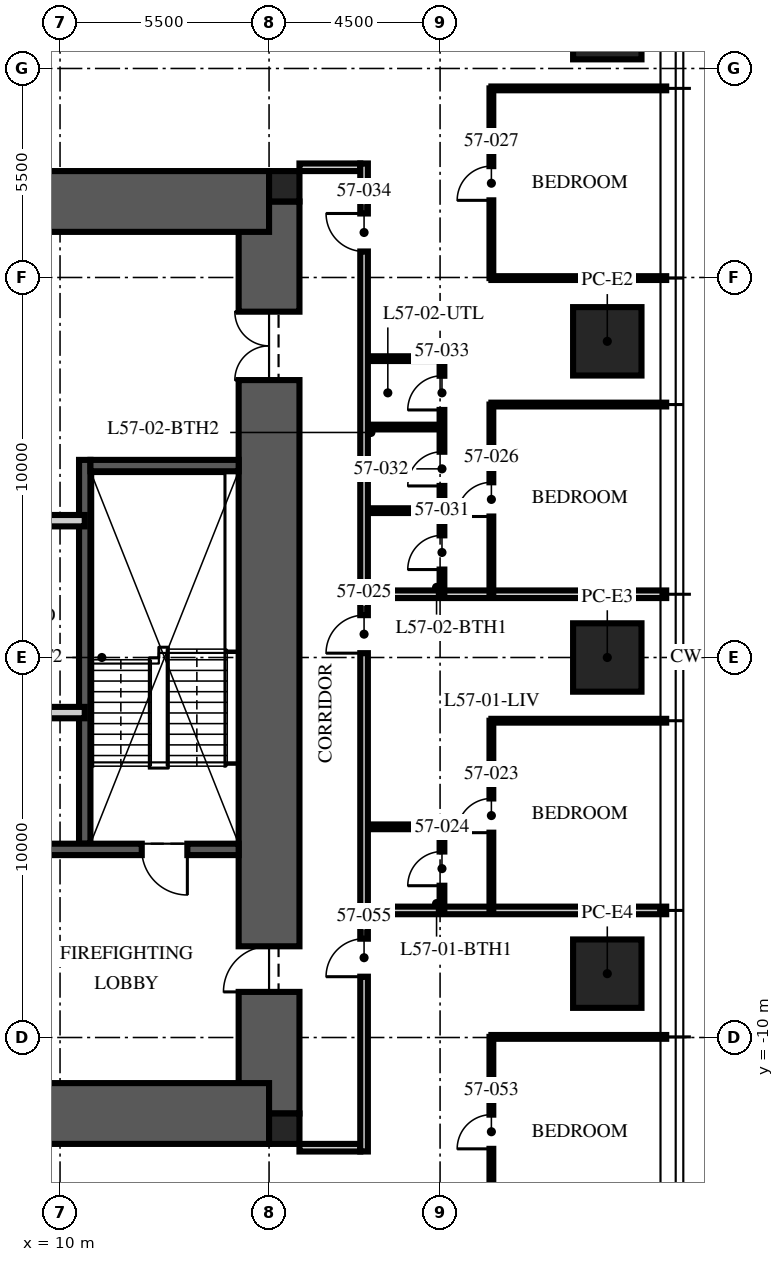
"""IFC4 building model, lengths in metres.
Left out: names, types, materials, properties, quantities, classifications, styles, units other than length and angle.
Written with IfcOpenShell. Run it as: python <this file> out.ifc"""

import sys

from ifc_helpers import new_model, si_unit, direction, frame, frame_2d, origin, origin_2d, place, context, subcontext, project, spatial, rectangle, extrude, element, fill, save


model = new_model("IFC4")
c1 = context("Model", 3, precision=1e-05, world=origin(), true_north=direction((0.0, 1.0)))
c2 = subcontext(c1, "Body", "Model", "MODEL_VIEW")
j1 = project(units=[si_unit("LENGTHUNIT", "METRE"), si_unit("PLANEANGLEUNIT", "RADIAN")], contexts=[c1])
p1 = place(None, origin())
s1 = spatial("IfcSite", under=j1, at=p1, CompositionType="ELEMENT")
p2 = place(p1, origin())
s2 = spatial("IfcBuilding", under=s1, at=p2, CompositionType="ELEMENT")
p3 = place(p2, frame((0.0, 0.0, 229.5)))
s3 = spatial("IfcBuildingStorey", under=s2, at=p3, CompositionType="ELEMENT", Elevation=229.5)
p4 = place(p3, frame((15.5, -12.0, -0.25), z_axis=(0.0, 0.0, 1.0), x_axis=(0.0, 1.0, 0.0)))
e1 = element("IfcWall", 1, at=p4, inside=s3, PredefinedType="SHEAR", context=c2, shape_type="SweptSolid", body=[
    extrude(rectangle(XDim=24.0, YDim=1.6, at=frame_2d((12.0, 0.0))), origin(), (0.0, 0.0, 1.0), 3.75),
])
p5 = place(p4, frame((3.2, 0.0, 0.25)))
e2 = element("IfcOpeningElement", 2, at=p5, cuts=e1, PredefinedType="OPENING", context=c2, shape_type="SweptSolid", body=[
    extrude(rectangle(XDim=1.2, YDim=2.1, at=frame_2d((0.6, 1.05))), frame((0.0, 0.81, 0.0), z_axis=(0.0, -1.0, 0.0), x_axis=(1.0, 0.0, 0.0)), (0.0, 0.0, 1.0), 1.62),
])
p6 = place(p4, frame((19.3, 0.0, 0.25)))
e3 = element("IfcOpeningElement", 3, at=p6, cuts=e1, PredefinedType="OPENING", context=c2, shape_type="SweptSolid", body=[
    extrude(rectangle(XDim=1.8, YDim=2.1, at=frame_2d((0.9, 1.05))), frame((0.0, 0.81, 0.0), z_axis=(0.0, -1.0, 0.0), x_axis=(1.0, 0.0, 0.0)), (0.0, 0.0, 1.0), 1.62),
])
for number, where, z_axis, x_axis in (
    (4, (-15.5, 12.0, -0.25), (0.0, 0.0, 1.0), (1.0, 0.0, 0.0)),
    (5, (-15.5, -12.0, -0.25), (0.0, 0.0, 1.0), (1.0, 0.0, 0.0)),
):
    element("IfcWall", number, at=place(p3, frame(where, z_axis=z_axis, x_axis=x_axis)), inside=s3, PredefinedType="SHEAR", context=c2, shape_type="SweptSolid", body=[
        extrude(rectangle(XDim=31.0, YDim=1.6, at=frame_2d((15.5, 0.0))), origin(), (0.0, 0.0, 1.0), 3.75),
    ])
for number, where, z_axis, x_axis in (
    (6, (15.9, 12.4, -0.25), (0.0, 0.0, 1.0), (1.0, 0.0, 0.0)),
    (7, (15.9, -12.4, -0.25), (0.0, 0.0, 1.0), (1.0, 0.0, 0.0)),
):
    element("IfcColumn", number, at=place(p3, frame(where, z_axis=z_axis, x_axis=x_axis)), inside=s3, PredefinedType="COLUMN", context=c2, shape_type="SweptSolid", body=[
        extrude(rectangle(XDim=0.8, YDim=0.8, at=origin_2d()), origin(), (0.0, 0.0, 1.0), 3.75),
    ])
for number, where, z_axis, x_axis in (
    (8, (24.4, 16.64, 0.0), (0.0, 0.0, 1.0), (0.0, 1.0, 0.0)),
    (9, (24.4, 8.32, 0.0), (0.0, 0.0, 1.0), (0.0, 1.0, 0.0)),
    (10, (24.4, 0.0, 0.0), (0.0, 0.0, 1.0), (0.0, 1.0, 0.0)),
    (11, (24.4, -8.32, 0.0), (0.0, 0.0, 1.0), (0.0, 1.0, 0.0)),
):
    element("IfcColumn", number, at=place(p3, frame(where, z_axis=z_axis, x_axis=x_axis)), inside=s3, PredefinedType="COLUMN", context=c2, shape_type="SweptSolid", body=[
        extrude(rectangle(XDim=1.8, YDim=1.8, at=origin_2d()), origin(), (0.0, 0.0, 1.0), 3.75),
    ])
p7 = place(p3, frame((10.65, -4.9, 0.0), z_axis=(0.0, 0.0, 1.0), x_axis=(0.0, 1.0, 0.0)))
e12 = element("IfcWall", 12, at=p7, inside=s3, PredefinedType="SOLIDWALL", context=c2, shape_type="SweptSolid", body=[
    extrude(rectangle(XDim=10.1, YDim=0.3, at=frame_2d((5.05, 0.0))), origin(), (0.0, 0.0, 1.0), 3.5),
])
p8 = place(p3, frame((14.7, -5.05, 0.0), z_axis=(0.0, 0.0, 1.0), x_axis=(-1.0, 0.0, 0.0)))
e13 = element("IfcWall", 13, at=p8, inside=s3, PredefinedType="SOLIDWALL", context=c2, shape_type="SweptSolid", body=[
    extrude(rectangle(XDim=5.9, YDim=0.3, at=frame_2d((2.95, 0.0))), origin(), (0.0, 0.0, 1.0), 3.5),
])
p9 = place(p8, frame((1.35, 0.0, 0.0)))
e14 = element("IfcOpeningElement", 14, at=p9, cuts=e13, PredefinedType="OPENING", context=c2, shape_type="SweptSolid", body=[
    extrude(rectangle(XDim=1.2, YDim=2.1, at=frame_2d((0.6, 1.05))), frame((0.0, 0.16, 0.0), z_axis=(0.0, -1.0, 0.0), x_axis=(1.0, 0.0, 0.0)), (0.0, 0.0, 1.0), 0.32),
])
p10 = place(p3, frame((14.7, 5.05, 0.0), z_axis=(0.0, 0.0, 1.0), x_axis=(-1.0, 0.0, 0.0)))
e15 = element("IfcWall", 15, at=p10, inside=s3, PredefinedType="SOLIDWALL", context=c2, shape_type="SweptSolid", body=[
    extrude(rectangle(XDim=3.9, YDim=0.3, at=frame_2d((1.95, 0.0))), origin(), (0.0, 0.0, 1.0), 3.5),
])
p11 = place(p3, frame((-10.65, 3.6, 0.0), z_axis=(0.0, 0.0, 1.0), x_axis=(1.0, 0.0, 0.0)))
e16 = element("IfcWall", 16, at=p11, inside=s3, PredefinedType="PARTITIONING", context=c2, shape_type="SweptSolid", body=[
    extrude(rectangle(XDim=21.3, YDim=0.3, at=frame_2d((10.65, 0.0))), origin(), (0.0, 0.0, 1.0), 3.5),
])
p12 = place(p11, frame((10.05, 0.0, 0.0)))
e17 = element("IfcOpeningElement", 17, at=p12, cuts=e16, PredefinedType="OPENING", context=c2, shape_type="SweptSolid", body=[
    extrude(rectangle(XDim=1.2, YDim=2.1, at=frame_2d((0.6, 1.05))), frame((0.0, 0.16, 0.0), z_axis=(0.0, -1.0, 0.0), x_axis=(1.0, 0.0, 0.0)), (0.0, 0.0, 1.0), 0.32),
])
p13 = place(p11, frame((19.238, 0.0, 0.0)))
e18 = element("IfcOpeningElement", 18, at=p13, cuts=e16, PredefinedType="OPENING", context=c2, shape_type="SweptSolid", body=[
    extrude(rectangle(XDim=0.9, YDim=2.1, at=frame_2d((0.45, 1.05))), frame((0.0, 0.16, 0.0), z_axis=(0.0, -1.0, 0.0), x_axis=(1.0, 0.0, 0.0)), (0.0, 0.0, 1.0), 0.32),
])
p14 = place(p3, frame((10.65, -1.45, 0.0), z_axis=(0.0, 0.0, 1.0), x_axis=(-1.0, 0.0, 0.0)))
e19 = element("IfcWall", 19, at=p14, inside=s3, PredefinedType="PARTITIONING", context=c2, shape_type="SweptSolid", body=[
    extrude(rectangle(XDim=6.45, YDim=0.3, at=frame_2d((3.225, 0.0))), origin(), (0.0, 0.0, 1.0), 3.5),
])
for number, where, z_axis, x_axis in (
    (20, (16.3, 12.9, 0.0), (0.0, 0.0, 1.0), (1.0, 0.0, 0.0)),
    (21, (16.3, -12.9, 0.0), (0.0, 0.0, 1.0), (1.0, 0.0, 0.0)),
):
    element("IfcWall", number, at=place(p3, frame(where, z_axis=z_axis, x_axis=x_axis)), inside=s3, PredefinedType="PARTITIONING", context=c2, shape_type="SweptSolid", body=[
        extrude(rectangle(XDim=1.6, YDim=0.2, at=frame_2d((0.8, 0.0))), origin(), (0.0, 0.0, 1.0), 2.3),
    ])
p15 = place(p3, frame((18.1, -6.656, 0.0), z_axis=(0.0, 0.0, 1.0), x_axis=(1.0, 0.0, 0.0)))
e22 = element("IfcWall", 22, at=p15, inside=s3, PredefinedType="PARTITIONING", context=c2, shape_type="SweptSolid", body=[
    extrude(rectangle(XDim=7.85, YDim=0.2, at=frame_2d((3.925, 0.0))), origin(), (0.0, 0.0, 1.0), 2.91),
])
p16 = place(p3, frame((21.35, -1.664, 0.0), z_axis=(0.0, 0.0, 1.0), x_axis=(1.0, 0.0, 0.0)))
e23 = element("IfcWall", 23, at=p16, inside=s3, PredefinedType="PARTITIONING", context=c2, shape_type="SweptSolid", body=[
    extrude(rectangle(XDim=4.6, YDim=0.1, at=frame_2d((2.3, 0.0))), origin(), (0.0, 0.0, 1.0), 2.91),
])
p17 = place(p3, frame((18.1, 1.664, 0.0), z_axis=(0.0, 0.0, 1.0), x_axis=(1.0, 0.0, 0.0)))
e24 = element("IfcWall", 24, at=p17, inside=s3, PredefinedType="PARTITIONING", context=c2, shape_type="SweptSolid", body=[
    extrude(rectangle(XDim=7.85, YDim=0.2, at=frame_2d((3.925, 0.0))), origin(), (0.0, 0.0, 1.0), 2.91),
])
for number, where, z_axis, x_axis in (
    (25, (21.35, 6.656, 0.0), (0.0, 0.0, 1.0), (1.0, 0.0, 0.0)),
    (26, (21.35, 9.984, 0.0), (0.0, 0.0, 1.0), (1.0, 0.0, 0.0)),
    (27, (21.35, 14.976, 0.0), (0.0, 0.0, 1.0), (1.0, 0.0, 0.0)),
    (28, (21.35, -9.984, 0.0), (0.0, 0.0, 1.0), (1.0, 0.0, 0.0)),
):
    element("IfcWall", number, at=place(p3, frame(where, z_axis=z_axis, x_axis=x_axis)), inside=s3, PredefinedType="PARTITIONING", context=c2, shape_type="SweptSolid", body=[
        extrude(rectangle(XDim=4.6, YDim=0.1, at=frame_2d((2.3, 0.0))), origin(), (0.0, 0.0, 1.0), 2.91),
    ])
p18 = place(p3, frame((21.35, -6.656, 0.0), z_axis=(0.0, 0.0, 1.0), x_axis=(0.0, 1.0, 0.0)))
e29 = element("IfcWall", 29, at=p18, inside=s3, PredefinedType="PARTITIONING", context=c2, shape_type="SweptSolid", body=[
    extrude(rectangle(XDim=4.992, YDim=0.1, at=frame_2d((2.496, 0.0))), origin(), (0.0, 0.0, 1.0), 2.81),
])
p19 = place(p18, frame((2.046, 0.0, 0.0)))
e30 = element("IfcOpeningElement", 30, at=p19, cuts=e29, PredefinedType="OPENING", context=c2, shape_type="SweptSolid", body=[
    extrude(rectangle(XDim=0.9, YDim=2.1, at=frame_2d((0.45, 1.05))), frame((0.0, 0.06, 0.0), z_axis=(0.0, -1.0, 0.0), x_axis=(1.0, 0.0, 0.0)), (0.0, 0.0, 1.0), 0.12),
])
p20 = place(p3, frame((20.05, -6.656, 0.0), z_axis=(0.0, 0.0, 1.0), x_axis=(0.0, 1.0, 0.0)))
e31 = element("IfcWall", 31, at=p20, inside=s3, PredefinedType="PARTITIONING", context=c2, shape_type="SweptSolid", body=[
    extrude(rectangle(XDim=2.2, YDim=0.125, at=frame_2d((1.1, 0.0))), origin(), (0.0, 0.0, 1.0), 3.5),
])
p21 = place(p20, frame((0.65, 0.0, 0.0)))
e32 = element("IfcOpeningElement", 32, at=p21, cuts=e31, PredefinedType="OPENING", context=c2, shape_type="SweptSolid", body=[
    extrude(rectangle(XDim=0.9, YDim=2.1, at=frame_2d((0.45, 1.05))), frame((0.0, 0.073, 0.0), z_axis=(0.0, -1.0, 0.0), x_axis=(1.0, 0.0, 0.0)), (0.0, 0.0, 1.0), 0.145),
])
p22 = place(p3, frame((18.1, -4.456, 0.0), z_axis=(0.0, 0.0, 1.0), x_axis=(1.0, 0.0, 0.0)))
e33 = element("IfcWall", 33, at=p22, inside=s3, PredefinedType="PARTITIONING", context=c2, shape_type="SweptSolid", body=[
    extrude(rectangle(XDim=1.95, YDim=0.125, at=frame_2d((0.975, 0.0))), origin(), (0.0, 0.0, 1.0), 3.5),
])
p23 = place(p3, frame((21.35, 1.664, 0.0), z_axis=(0.0, 0.0, 1.0), x_axis=(0.0, 1.0, 0.0)))
e34 = element("IfcWall", 34, at=p23, inside=s3, PredefinedType="PARTITIONING", context=c2, shape_type="SweptSolid", body=[
    extrude(rectangle(XDim=4.992, YDim=0.1, at=frame_2d((2.496, 0.0))), origin(), (0.0, 0.0, 1.0), 2.81),
])
p24 = place(p23, frame((2.046, 0.0, 0.0)))
e35 = element("IfcOpeningElement", 35, at=p24, cuts=e34, PredefinedType="OPENING", context=c2, shape_type="SweptSolid", body=[
    extrude(rectangle(XDim=0.9, YDim=2.1, at=frame_2d((0.45, 1.05))), frame((0.0, 0.06, 0.0), z_axis=(0.0, -1.0, 0.0), x_axis=(1.0, 0.0, 0.0)), (0.0, 0.0, 1.0), 0.12),
])
p25 = place(p3, frame((21.35, 9.984, 0.0), z_axis=(0.0, 0.0, 1.0), x_axis=(0.0, 1.0, 0.0)))
e36 = element("IfcWall", 36, at=p25, inside=s3, PredefinedType="PARTITIONING", context=c2, shape_type="SweptSolid", body=[
    extrude(rectangle(XDim=4.992, YDim=0.1, at=frame_2d((2.496, 0.0))), origin(), (0.0, 0.0, 1.0), 2.81),
])
p26 = place(p25, frame((2.046, 0.0, 0.0)))
e37 = element("IfcOpeningElement", 37, at=p26, cuts=e36, PredefinedType="OPENING", context=c2, shape_type="SweptSolid", body=[
    extrude(rectangle(XDim=0.9, YDim=2.1, at=frame_2d((0.45, 1.05))), frame((0.0, 0.06, 0.0), z_axis=(0.0, -1.0, 0.0), x_axis=(1.0, 0.0, 0.0)), (0.0, 0.0, 1.0), 0.12),
])
p27 = place(p3, frame((20.05, 1.664, 0.0), z_axis=(0.0, 0.0, 1.0), x_axis=(0.0, 1.0, 0.0)))
e38 = element("IfcWall", 38, at=p27, inside=s3, PredefinedType="PARTITIONING", context=c2, shape_type="SweptSolid", body=[
    extrude(rectangle(XDim=6.2, YDim=0.125, at=frame_2d((3.1, 0.0))), origin(), (0.0, 0.0, 1.0), 2.81),
])
p28 = place(p27, frame((0.65, 0.0, 0.0)))
e39 = element("IfcOpeningElement", 39, at=p28, cuts=e38, PredefinedType="OPENING", context=c2, shape_type="SweptSolid", body=[
    extrude(rectangle(XDim=0.9, YDim=2.1, at=frame_2d((0.45, 1.05))), frame((0.0, 0.073, 0.0), z_axis=(0.0, -1.0, 0.0), x_axis=(1.0, 0.0, 0.0)), (0.0, 0.0, 1.0), 0.145),
])
p29 = place(p27, frame((2.85, 0.0, 0.0)))
e40 = element("IfcOpeningElement", 40, at=p29, cuts=e38, PredefinedType="OPENING", context=c2, shape_type="SweptSolid", body=[
    extrude(rectangle(XDim=0.9, YDim=2.1, at=frame_2d((0.45, 1.05))), frame((0.0, 0.073, 0.0), z_axis=(0.0, -1.0, 0.0), x_axis=(1.0, 0.0, 0.0)), (0.0, 0.0, 1.0), 0.145),
])
p30 = place(p27, frame((4.85, 0.0, 0.0)))
e41 = element("IfcOpeningElement", 41, at=p30, cuts=e38, PredefinedType="OPENING", context=c2, shape_type="SweptSolid", body=[
    extrude(rectangle(XDim=0.9, YDim=2.1, at=frame_2d((0.45, 1.05))), frame((0.0, 0.073, 0.0), z_axis=(0.0, -1.0, 0.0), x_axis=(1.0, 0.0, 0.0)), (0.0, 0.0, 1.0), 0.145),
])
for number, where, z_axis, x_axis in (
    (42, (18.1, 3.864, 0.0), (0.0, 0.0, 1.0), (1.0, 0.0, 0.0)),
    (43, (18.1, 6.064, 0.0), (0.0, 0.0, 1.0), (1.0, 0.0, 0.0)),
    (44, (18.1, 7.864, 0.0), (0.0, 0.0, 1.0), (1.0, 0.0, 0.0)),
):
    element("IfcWall", number, at=place(p3, frame(where, z_axis=z_axis, x_axis=x_axis)), inside=s3, PredefinedType="PARTITIONING", context=c2, shape_type="SweptSolid", body=[
        extrude(rectangle(XDim=1.95, YDim=0.125, at=frame_2d((0.975, 0.0))), origin(), (0.0, 0.0, 1.0), 3.5),
    ])
p31 = place(p3, frame((21.35, -14.976, 0.0), z_axis=(0.0, 0.0, 1.0), x_axis=(0.0, 1.0, 0.0)))
e45 = element("IfcWall", 45, at=p31, inside=s3, PredefinedType="PARTITIONING", context=c2, shape_type="SweptSolid", body=[
    extrude(rectangle(XDim=4.992, YDim=0.1, at=frame_2d((2.496, 0.0))), origin(), (0.0, 0.0, 1.0), 2.81),
])
p32 = place(p31, frame((2.046, 0.0, 0.0)))
e46 = element("IfcOpeningElement", 46, at=p32, cuts=e45, PredefinedType="OPENING", context=c2, shape_type="SweptSolid", body=[
    extrude(rectangle(XDim=0.9, YDim=2.1, at=frame_2d((0.45, 1.05))), frame((0.0, 0.06, 0.0), z_axis=(0.0, -1.0, 0.0), x_axis=(1.0, 0.0, 0.0)), (0.0, 0.0, 1.0), 0.12),
])
p33 = place(p3, frame((18.0, -13.0, 0.0), z_axis=(0.0, 0.0, 1.0), x_axis=(0.0, 1.0, 0.0)))
e47 = element("IfcWall", 47, at=p33, inside=s3, PredefinedType="PARTITIONING", context=c2, shape_type="SweptSolid", body=[
    extrude(rectangle(XDim=26.0, YDim=0.2, at=frame_2d((13.0, 0.0))), origin(), (0.0, 0.0, 1.0), 2.6),
])
p34 = place(p33, frame((13.114, 0.0, 0.0)))
e48 = element("IfcOpeningElement", 48, at=p34, cuts=e47, PredefinedType="OPENING", context=c2, shape_type="SweptSolid", body=[
    extrude(rectangle(XDim=1.0, YDim=2.2, at=frame_2d((0.5, 1.1))), frame((0.0, 0.11, 0.0), z_axis=(0.0, -1.0, 0.0), x_axis=(1.0, 0.0, 0.0)), (0.0, 0.0, 1.0), 0.22),
])
p35 = place(p33, frame((23.684, 0.0, 0.0)))
e49 = element("IfcOpeningElement", 49, at=p35, cuts=e47, PredefinedType="OPENING", context=c2, shape_type="SweptSolid", body=[
    extrude(rectangle(XDim=1.0, YDim=2.2, at=frame_2d((0.5, 1.1))), frame((0.0, 0.11, 0.0), z_axis=(0.0, -1.0, 0.0), x_axis=(1.0, 0.0, 0.0)), (0.0, 0.0, 1.0), 0.22),
])
p36 = place(p33, frame((4.6, 0.0, 0.0)))
e50 = element("IfcOpeningElement", 50, at=p36, cuts=e47, PredefinedType="OPENING", context=c2, shape_type="SweptSolid", body=[
    extrude(rectangle(XDim=1.0, YDim=2.2, at=frame_2d((0.5, 1.1))), frame((0.0, 0.11, 0.0), z_axis=(0.0, -1.0, 0.0), x_axis=(1.0, 0.0, 0.0)), (0.0, 0.0, 1.0), 0.22),
])
p37 = place(p9, origin())
e51 = element("IfcDoor", 51, at=p37, inside=s3, OperationType="SINGLE_SWING_LEFT", PredefinedType="DOOR", context=c2, shape_type="SweptSolid", body=[
    extrude(rectangle(XDim=1.2, YDim=2.1, at=frame_2d((0.6, 1.05))), frame((0.0, 0.025, 0.0), z_axis=(0.0, -1.0, 0.0), x_axis=(1.0, 0.0, 0.0)), (0.0, 0.0, 1.0), 0.05),
])
fill(e14, e51)
p38 = place(p5, origin())
e52 = element("IfcDoor", 52, at=p38, inside=s3, OperationType="SINGLE_SWING_LEFT", PredefinedType="DOOR", context=c2, shape_type="SweptSolid", body=[
    extrude(rectangle(XDim=1.2, YDim=2.1, at=frame_2d((0.6, 1.05))), frame((0.0, 0.025, 0.0), z_axis=(0.0, -1.0, 0.0), x_axis=(1.0, 0.0, 0.0)), (0.0, 0.0, 1.0), 0.05),
])
fill(e2, e52)
p39 = place(p6, origin())
e53 = element("IfcDoor", 53, at=p39, inside=s3, OperationType="DOUBLE_DOOR_SINGLE_SWING", PredefinedType="DOOR", context=c2, shape_type="SweptSolid", body=[
    extrude(rectangle(XDim=1.8, YDim=2.1, at=frame_2d((0.9, 1.05))), frame((0.0, 0.025, 0.0), z_axis=(0.0, -1.0, 0.0), x_axis=(1.0, 0.0, 0.0)), (0.0, 0.0, 1.0), 0.05),
])
fill(e3, e53)
p40 = place(p19, origin())
e54 = element("IfcDoor", 54, at=p40, inside=s3, OperationType="SINGLE_SWING_LEFT", PredefinedType="DOOR", context=c2, shape_type="SweptSolid", body=[
    extrude(rectangle(XDim=0.9, YDim=2.1, at=frame_2d((0.45, 1.05))), frame((0.0, 0.025, 0.0), z_axis=(0.0, -1.0, 0.0), x_axis=(1.0, 0.0, 0.0)), (0.0, 0.0, 1.0), 0.05),
])
fill(e30, e54)
p41 = place(p21, origin())
e55 = element("IfcDoor", 55, at=p41, inside=s3, OperationType="SINGLE_SWING_LEFT", PredefinedType="DOOR", context=c2, shape_type="SweptSolid", body=[
    extrude(rectangle(XDim=0.9, YDim=2.1, at=frame_2d((0.45, 1.05))), frame((0.0, 0.025, 0.0), z_axis=(0.0, -1.0, 0.0), x_axis=(1.0, 0.0, 0.0)), (0.0, 0.0, 1.0), 0.05),
])
fill(e32, e55)
p42 = place(p34, origin())
e56 = element("IfcDoor", 56, at=p42, inside=s3, OperationType="SINGLE_SWING_LEFT", PredefinedType="DOOR", context=c2, shape_type="SweptSolid", body=[
    extrude(rectangle(XDim=1.0, YDim=2.2, at=frame_2d((0.5, 1.1))), frame((0.0, 0.025, 0.0), z_axis=(0.0, -1.0, 0.0), x_axis=(1.0, 0.0, 0.0)), (0.0, 0.0, 1.0), 0.05),
])
fill(e48, e56)
p43 = place(p24, origin())
e57 = element("IfcDoor", 57, at=p43, inside=s3, OperationType="SINGLE_SWING_LEFT", PredefinedType="DOOR", context=c2, shape_type="SweptSolid", body=[
    extrude(rectangle(XDim=0.9, YDim=2.1, at=frame_2d((0.45, 1.05))), frame((0.0, 0.025, 0.0), z_axis=(0.0, -1.0, 0.0), x_axis=(1.0, 0.0, 0.0)), (0.0, 0.0, 1.0), 0.05),
])
fill(e35, e57)
p44 = place(p26, origin())
e58 = element("IfcDoor", 58, at=p44, inside=s3, OperationType="SINGLE_SWING_LEFT", PredefinedType="DOOR", context=c2, shape_type="SweptSolid", body=[
    extrude(rectangle(XDim=0.9, YDim=2.1, at=frame_2d((0.45, 1.05))), frame((0.0, 0.025, 0.0), z_axis=(0.0, -1.0, 0.0), x_axis=(1.0, 0.0, 0.0)), (0.0, 0.0, 1.0), 0.05),
])
fill(e37, e58)
p45 = place(p28, origin())
e59 = element("IfcDoor", 59, at=p45, inside=s3, OperationType="SINGLE_SWING_LEFT", PredefinedType="DOOR", context=c2, shape_type="SweptSolid", body=[
    extrude(rectangle(XDim=0.9, YDim=2.1, at=frame_2d((0.45, 1.05))), frame((0.0, 0.025, 0.0), z_axis=(0.0, -1.0, 0.0), x_axis=(1.0, 0.0, 0.0)), (0.0, 0.0, 1.0), 0.05),
])
fill(e39, e59)
p46 = place(p29, origin())
e60 = element("IfcDoor", 60, at=p46, inside=s3, OperationType="SINGLE_SWING_LEFT", PredefinedType="DOOR", context=c2, shape_type="SweptSolid", body=[
    extrude(rectangle(XDim=0.9, YDim=2.1, at=frame_2d((0.45, 1.05))), frame((0.0, 0.025, 0.0), z_axis=(0.0, -1.0, 0.0), x_axis=(1.0, 0.0, 0.0)), (0.0, 0.0, 1.0), 0.05),
])
fill(e40, e60)
p47 = place(p30, origin())
e61 = element("IfcDoor", 61, at=p47, inside=s3, OperationType="SINGLE_SWING_LEFT", PredefinedType="DOOR", context=c2, shape_type="SweptSolid", body=[
    extrude(rectangle(XDim=0.9, YDim=2.1, at=frame_2d((0.45, 1.05))), frame((0.0, 0.025, 0.0), z_axis=(0.0, -1.0, 0.0), x_axis=(1.0, 0.0, 0.0)), (0.0, 0.0, 1.0), 0.05),
])
fill(e41, e61)
p48 = place(p35, origin())
e62 = element("IfcDoor", 62, at=p48, inside=s3, OperationType="SINGLE_SWING_RIGHT", PredefinedType="DOOR", context=c2, shape_type="SweptSolid", body=[
    extrude(rectangle(XDim=1.0, YDim=2.2, at=frame_2d((0.5, 1.1))), frame((0.0, 0.025, 0.0), z_axis=(0.0, -1.0, 0.0), x_axis=(1.0, 0.0, 0.0)), (0.0, 0.0, 1.0), 0.05),
])
fill(e49, e62)
p49 = place(p32, origin())
e63 = element("IfcDoor", 63, at=p49, inside=s3, OperationType="SINGLE_SWING_LEFT", PredefinedType="DOOR", context=c2, shape_type="SweptSolid", body=[
    extrude(rectangle(XDim=0.9, YDim=2.1, at=frame_2d((0.45, 1.05))), frame((0.0, 0.025, 0.0), z_axis=(0.0, -1.0, 0.0), x_axis=(1.0, 0.0, 0.0)), (0.0, 0.0, 1.0), 0.05),
])
fill(e46, e63)
p50 = place(p36, origin())
e64 = element("IfcDoor", 64, at=p50, inside=s3, OperationType="SINGLE_SWING_LEFT", PredefinedType="DOOR", context=c2, shape_type="SweptSolid", body=[
    extrude(rectangle(XDim=1.0, YDim=2.2, at=frame_2d((0.5, 1.1))), frame((0.0, 0.025, 0.0), z_axis=(0.0, -1.0, 0.0), x_axis=(1.0, 0.0, 0.0)), (0.0, 0.0, 1.0), 0.05),
])
fill(e50, e64)
save(model, sys.argv[1])
